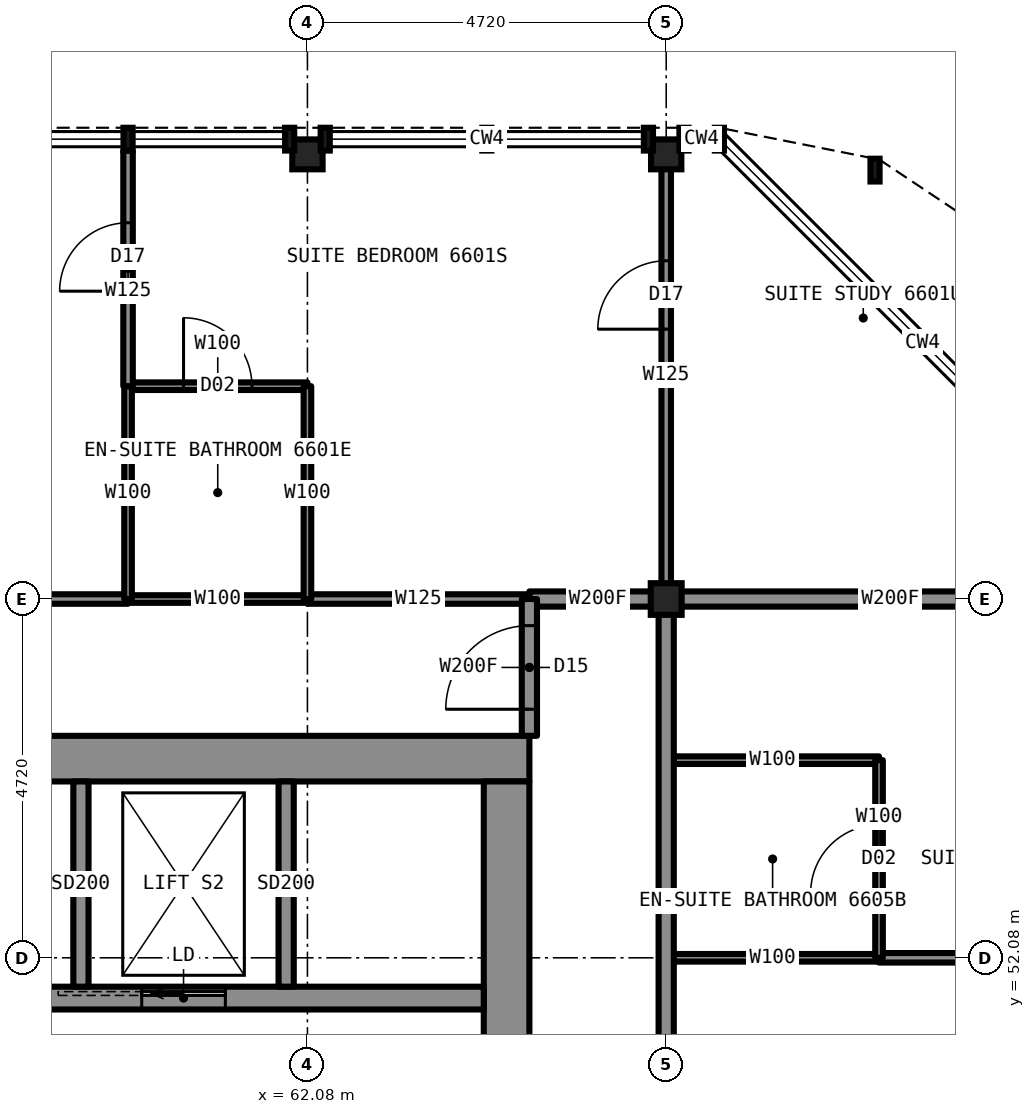
"""IFC4 building model, lengths in metres.
Left out: names, types, materials, properties, quantities, classifications, styles, units other than length and angle.
Written with IfcOpenShell. Run it as: python <this file> out.ifc"""

import sys

from ifc_helpers import new_model, si_unit, direction, frame, frame_2d, origin, origin_2d, place, context, subcontext, project, spatial, rectangle, i_section, extrude, element, fill, save


model = new_model("IFC4")
c1 = context("Model", 3, precision=1e-05, world=origin(), true_north=direction((0.0, 1.0)))
c2 = subcontext(c1, "Body", "Model", "MODEL_VIEW")
j1 = project(units=[si_unit("LENGTHUNIT", "METRE"), si_unit("PLANEANGLEUNIT", "RADIAN")], contexts=[c1])
p1 = place(None, origin())
s1 = spatial("IfcSite", under=j1, at=p1, CompositionType="ELEMENT")
p2 = place(p1, origin())
s2 = spatial("IfcBuilding", under=s1, at=p2, CompositionType="ELEMENT")
p3 = place(p2, frame((0.0, 0.0, 237.2)))
s3 = spatial("IfcBuildingStorey", under=s2, at=p3, CompositionType="ELEMENT", Elevation=237.2)
for number, where, z_axis, x_axis in (
    (1, (62.08, 62.65, 0.0), (0.0, 0.0, 1.0), (1.0, 0.0, 0.0)),
    (2, (66.8, 62.65, 0.0), (0.0, 0.0, 1.0), (1.0, 0.0, 0.0)),
):
    element("IfcColumn", number, at=place(p3, frame(where, z_axis=z_axis, x_axis=x_axis)), inside=s3, PredefinedType="COLUMN", context=c2, shape_type="SweptSolid", body=[
        extrude(i_section(OverallWidth=0.399, OverallDepth=0.394, WebThickness=0.023, FlangeThickness=0.037, at=origin_2d()), origin(), (0.0, 0.0, 1.0), 3.5),
    ])
p4 = place(p3, frame((66.8, 56.8, 0.0), z_axis=(0.0, 0.0, 1.0), x_axis=(1.0, 0.0, 0.0)))
e3 = element("IfcColumn", 3, at=p4, inside=s3, PredefinedType="COLUMN", context=c2, shape_type="SweptSolid", body=[
    extrude(i_section(OverallWidth=0.406, OverallDepth=0.417, WebThickness=0.03, FlangeThickness=0.048, at=origin_2d()), origin(), (0.0, 0.0, 1.0), 3.5),
])
p5 = place(p3, frame((45.0, 54.7, 0.0), z_axis=(0.0, 0.0, 1.0), x_axis=(1.0, 0.0, 0.0)))
e4 = element("IfcWall", 4, at=p5, inside=s3, PredefinedType="SHEAR", context=c2, shape_type="SweptSolid", body=[
    extrude(rectangle(XDim=20.0, YDim=0.6, at=frame_2d((10.0, 0.0))), origin(), (0.0, 0.0, 1.0), 3.5),
])
p6 = place(p3, frame((64.7, 35.6, 0.0), z_axis=(0.0, 0.0, 1.0), x_axis=(0.0, 1.0, 0.0)))
e5 = element("IfcWall", 5, at=p6, inside=s3, PredefinedType="SHEAR", context=c2, shape_type="SweptSolid", body=[
    extrude(rectangle(XDim=18.8, YDim=0.6, at=frame_2d((9.4, 0.0))), origin(), (0.0, 0.0, 1.0), 3.5),
])
p7 = place(p6, frame((13.4, 0.0, 0.0)))
e6 = element("IfcOpeningElement", 6, at=p7, cuts=e5, PredefinedType="OPENING", context=c2, shape_type="SweptSolid", body=[
    extrude(rectangle(XDim=1.8, YDim=2.2, at=frame_2d((0.9, 1.1))), frame((0.0, 0.31, 0.0), z_axis=(0.0, -1.0, 0.0), x_axis=(1.0, 0.0, 0.0)), (0.0, 0.0, 1.0), 0.62),
])
p8 = place(p6, frame((3.6, 0.0, 0.0)))
e7 = element("IfcOpeningElement", 7, at=p8, cuts=e5, PredefinedType="OPENING", context=c2, shape_type="SweptSolid", body=[
    extrude(rectangle(XDim=1.8, YDim=2.2, at=frame_2d((0.9, 1.1))), frame((0.0, 0.31, 0.0), z_axis=(0.0, -1.0, 0.0), x_axis=(1.0, 0.0, 0.0)), (0.0, 0.0, 1.0), 0.62),
])
p9 = place(p3, frame((45.6, 51.55, 0.0), z_axis=(0.0, 0.0, 1.0), x_axis=(1.0, 0.0, 0.0)))
e8 = element("IfcWall", 8, at=p9, inside=s3, PredefinedType="SHEAR", context=c2, shape_type="SweptSolid", body=[
    extrude(rectangle(XDim=18.8, YDim=0.3, at=frame_2d((9.4, 0.0))), origin(), (0.0, 0.0, 1.0), 3.5),
])
p10 = place(p9, frame((4.8, 0.0, 0.0)))
e9 = element("IfcOpeningElement", 9, at=p10, cuts=e8, PredefinedType="OPENING", context=c2, shape_type="SweptSolid", body=[
    extrude(rectangle(XDim=1.0, YDim=2.1, at=frame_2d((0.5, 1.05))), frame((0.0, 0.16, 0.0), z_axis=(0.0, -1.0, 0.0), x_axis=(1.0, 0.0, 0.0)), (0.0, 0.0, 1.0), 0.32),
])
p11 = place(p9, frame((11.6, 0.0, 0.0)))
e10 = element("IfcOpeningElement", 10, at=p11, cuts=e8, PredefinedType="OPENING", context=c2, shape_type="SweptSolid", body=[
    extrude(rectangle(XDim=1.1, YDim=2.2, at=frame_2d((0.55, 1.1))), frame((0.0, 0.16, 0.0), z_axis=(0.0, -1.0, 0.0), x_axis=(1.0, 0.0, 0.0)), (0.0, 0.0, 1.0), 0.32),
])
p12 = place(p9, frame((14.3, 0.0, 0.0)))
e11 = element("IfcOpeningElement", 11, at=p12, cuts=e8, PredefinedType="OPENING", context=c2, shape_type="SweptSolid", body=[
    extrude(rectangle(XDim=1.1, YDim=2.2, at=frame_2d((0.55, 1.1))), frame((0.0, 0.16, 0.0), z_axis=(0.0, -1.0, 0.0), x_axis=(1.0, 0.0, 0.0)), (0.0, 0.0, 1.0), 0.32),
])
p13 = place(p3, frame((59.72, 56.8, 0.0), z_axis=(0.0, 0.0, 1.0), x_axis=(1.0, 0.0, 0.0)))
e12 = element("IfcWall", 12, at=p13, inside=s3, PredefinedType="PARTITIONING", context=c2, shape_type="SweptSolid", body=[
    extrude(rectangle(XDim=2.36, YDim=0.1, at=frame_2d((1.18, 0.0))), origin(), (0.0, 0.0, 1.0), 3.33),
])
p14 = place(p3, frame((65.0, 56.8, 0.0), z_axis=(0.0, 0.0, 1.0), x_axis=(1.0, 0.0, 0.0)))
e13 = element("IfcWall", 13, at=p14, inside=s3, PredefinedType="PARTITIONING", context=c2, shape_type="SweptSolid", body=[
    extrude(rectangle(XDim=1.8, YDim=0.2, at=frame_2d((0.9, 0.0))), origin(), (0.0, 0.0, 1.0), 3.33),
])
p15 = place(p3, frame((66.8, 56.8, 0.0), z_axis=(0.0, 0.0, 1.0), x_axis=(1.0, 0.0, 0.0)))
e14 = element("IfcWall", 14, at=p15, inside=s3, PredefinedType="PARTITIONING", context=c2, shape_type="SweptSolid", body=[
    extrude(rectangle(XDim=5.9, YDim=0.2, at=frame_2d((2.95, 0.0))), origin(), (0.0, 0.0, 1.0), 2.573),
])
p16 = place(p3, frame((51.88, 56.8, 0.0), z_axis=(0.0, 0.0, 1.0), x_axis=(1.0, 0.0, 0.0)))
e15 = element("IfcWall", 15, at=p16, inside=s3, PredefinedType="PARTITIONING", context=c2, shape_type="SweptSolid", body=[
    extrude(rectangle(XDim=7.84, YDim=0.125, at=frame_2d((3.92, 0.0))), origin(), (0.0, 0.0, 1.0), 3.33),
])
p17 = place(p16, frame((3.47, 0.0, 0.0)))
e16 = element("IfcOpeningElement", 16, at=p17, cuts=e15, PredefinedType="OPENING", context=c2, shape_type="SweptSolid", body=[
    extrude(rectangle(XDim=0.9, YDim=2.2, at=frame_2d((0.45, 1.1))), frame((0.0, 0.073, 0.0), z_axis=(0.0, -1.0, 0.0), x_axis=(1.0, 0.0, 0.0)), (0.0, 0.0, 1.0), 0.145),
])
p18 = place(p3, frame((62.08, 56.8, 0.0), z_axis=(0.0, 0.0, 1.0), x_axis=(1.0, 0.0, 0.0)))
e17 = element("IfcWall", 17, at=p18, inside=s3, PredefinedType="PARTITIONING", context=c2, shape_type="SweptSolid", body=[
    extrude(rectangle(XDim=2.92, YDim=0.125, at=frame_2d((1.46, 0.0))), origin(), (0.0, 0.0, 1.0), 3.33),
])
p19 = place(p3, frame((59.72, 59.6, 0.0), z_axis=(0.0, 0.0, 1.0), x_axis=(1.0, 0.0, 0.0)))
e18 = element("IfcWall", 18, at=p19, inside=s3, PredefinedType="PARTITIONING", context=c2, shape_type="SweptSolid", body=[
    extrude(rectangle(XDim=2.36, YDim=0.1, at=frame_2d((1.18, 0.0))), origin(), (0.0, 0.0, 1.0), 3.33),
])
p20 = place(p19, frame((0.73, 0.0, 0.0)))
e19 = element("IfcOpeningElement", 19, at=p20, cuts=e18, PredefinedType="OPENING", context=c2, shape_type="SweptSolid", body=[
    extrude(rectangle(XDim=0.9, YDim=2.1, at=frame_2d((0.45, 1.05))), frame((0.0, 0.06, 0.0), z_axis=(0.0, -1.0, 0.0), x_axis=(1.0, 0.0, 0.0)), (0.0, 0.0, 1.0), 0.12),
])
p21 = place(p3, frame((66.8, 52.08, 0.0), z_axis=(0.0, 0.0, 1.0), x_axis=(1.0, 0.0, 0.0)))
e20 = element("IfcWall", 20, at=p21, inside=s3, PredefinedType="PARTITIONING", context=c2, shape_type="SweptSolid", body=[
    extrude(rectangle(XDim=2.8, YDim=0.1, at=frame_2d((1.4, 0.0))), origin(), (0.0, 0.0, 1.0), 2.573),
])
p22 = place(p3, frame((69.6, 52.08, 0.0), z_axis=(0.0, 0.0, 1.0), x_axis=(1.0, 0.0, 0.0)))
e21 = element("IfcWall", 21, at=p22, inside=s3, PredefinedType="PARTITIONING", context=c2, shape_type="SweptSolid", body=[
    extrude(rectangle(XDim=3.1, YDim=0.125, at=frame_2d((1.55, 0.0))), origin(), (0.0, 0.0, 1.0), 2.573),
])
p23 = place(p22, frame((1.25, 0.0, 0.0)))
e22 = element("IfcOpeningElement", 22, at=p23, cuts=e21, PredefinedType="OPENING", context=c2, shape_type="SweptSolid", body=[
    extrude(rectangle(XDim=0.9, YDim=2.2, at=frame_2d((0.45, 1.1))), frame((0.0, 0.073, 0.0), z_axis=(0.0, -1.0, 0.0), x_axis=(1.0, 0.0, 0.0)), (0.0, 0.0, 1.0), 0.145),
])
p24 = place(p3, frame((66.8, 54.68, 0.0), z_axis=(0.0, 0.0, 1.0), x_axis=(1.0, 0.0, 0.0)))
e23 = element("IfcWall", 23, at=p24, inside=s3, PredefinedType="PARTITIONING", context=c2, shape_type="SweptSolid", body=[
    extrude(rectangle(XDim=2.8, YDim=0.1, at=frame_2d((1.4, 0.0))), origin(), (0.0, 0.0, 1.0), 3.33),
])
p25 = place(p3, frame((65.0, 55.0, 0.0), z_axis=(0.0, 0.0, 1.0), x_axis=(0.0, 1.0, 0.0)))
e24 = element("IfcWall", 24, at=p25, inside=s3, PredefinedType="PARTITIONING", context=c2, shape_type="SweptSolid", body=[
    extrude(rectangle(XDim=1.8, YDim=0.2, at=frame_2d((0.9, 0.0))), origin(), (0.0, 0.0, 1.0), 3.33),
])
p26 = place(p25, frame((0.35, 0.0, 0.0)))
e25 = element("IfcOpeningElement", 25, at=p26, cuts=e24, PredefinedType="OPENING", context=c2, shape_type="SweptSolid", body=[
    extrude(rectangle(XDim=1.1, YDim=2.2, at=frame_2d((0.55, 1.1))), frame((0.0, 0.11, 0.0), z_axis=(0.0, -1.0, 0.0), x_axis=(1.0, 0.0, 0.0)), (0.0, 0.0, 1.0), 0.22),
])
p27 = place(p3, frame((66.8, 33.2, 0.0), z_axis=(0.0, 0.0, 1.0), x_axis=(0.0, 1.0, 0.0)))
e26 = element("IfcWall", 26, at=p27, inside=s3, PredefinedType="PARTITIONING", context=c2, shape_type="SweptSolid", body=[
    extrude(rectangle(XDim=23.6, YDim=0.2, at=frame_2d((11.8, 0.0))), origin(), (0.0, 0.0, 1.0), 3.33),
])
p28 = place(p27, frame((8.85, 0.0, 0.0)))
e27 = element("IfcOpeningElement", 27, at=p28, cuts=e26, PredefinedType="OPENING", context=c2, shape_type="SweptSolid", body=[
    extrude(rectangle(XDim=1.1, YDim=2.2, at=frame_2d((0.55, 1.1))), frame((0.0, 0.11, 0.0), z_axis=(0.0, -1.0, 0.0), x_axis=(1.0, 0.0, 0.0)), (0.0, 0.0, 1.0), 0.22),
])
p29 = place(p27, frame((13.65, 0.0, 0.0)))
e28 = element("IfcOpeningElement", 28, at=p29, cuts=e26, PredefinedType="OPENING", context=c2, shape_type="SweptSolid", body=[
    extrude(rectangle(XDim=1.1, YDim=2.2, at=frame_2d((0.55, 1.1))), frame((0.0, 0.11, 0.0), z_axis=(0.0, -1.0, 0.0), x_axis=(1.0, 0.0, 0.0)), (0.0, 0.0, 1.0), 0.22),
])
p30 = place(p3, frame((66.8, 56.8, 0.0), z_axis=(0.0, 0.0, 1.0), x_axis=(0.0, 1.0, 0.0)))
e29 = element("IfcWall", 29, at=p30, inside=s3, PredefinedType="PARTITIONING", context=c2, shape_type="SweptSolid", body=[
    extrude(rectangle(XDim=5.9, YDim=0.125, at=frame_2d((2.95, 0.0))), origin(), (0.0, 0.0, 1.0), 2.573),
])
p31 = place(p30, frame((3.55, 0.0, 0.0)))
e30 = element("IfcOpeningElement", 30, at=p31, cuts=e29, PredefinedType="OPENING", context=c2, shape_type="SweptSolid", body=[
    extrude(rectangle(XDim=0.9, YDim=2.2, at=frame_2d((0.45, 1.1))), frame((0.0, 0.073, 0.0), z_axis=(0.0, -1.0, 0.0), x_axis=(1.0, 0.0, 0.0)), (0.0, 0.0, 1.0), 0.145),
])
p32 = place(p3, frame((69.6, 52.08, 0.0), z_axis=(0.0, 0.0, 1.0), x_axis=(0.0, 1.0, 0.0)))
e31 = element("IfcWall", 31, at=p32, inside=s3, PredefinedType="PARTITIONING", context=c2, shape_type="SweptSolid", body=[
    extrude(rectangle(XDim=2.6, YDim=0.1, at=frame_2d((1.3, 0.0))), origin(), (0.0, 0.0, 1.0), 3.33),
])
p33 = place(p32, frame((0.85, 0.0, 0.0)))
e32 = element("IfcOpeningElement", 32, at=p33, cuts=e31, PredefinedType="OPENING", context=c2, shape_type="SweptSolid", body=[
    extrude(rectangle(XDim=0.9, YDim=2.1, at=frame_2d((0.45, 1.05))), frame((0.0, 0.06, 0.0), z_axis=(0.0, -1.0, 0.0), x_axis=(1.0, 0.0, 0.0)), (0.0, 0.0, 1.0), 0.12),
])
p34 = place(p3, frame((59.72, 56.8, 0.0), z_axis=(0.0, 0.0, 1.0), x_axis=(0.0, 1.0, 0.0)))
e33 = element("IfcWall", 33, at=p34, inside=s3, PredefinedType="PARTITIONING", context=c2, shape_type="SweptSolid", body=[
    extrude(rectangle(XDim=2.8, YDim=0.1, at=frame_2d((1.4, 0.0))), origin(), (0.0, 0.0, 1.0), 3.33),
])
p35 = place(p3, frame((59.72, 59.6, 0.0), z_axis=(0.0, 0.0, 1.0), x_axis=(0.0, 1.0, 0.0)))
e34 = element("IfcWall", 34, at=p35, inside=s3, PredefinedType="PARTITIONING", context=c2, shape_type="SweptSolid", body=[
    extrude(rectangle(XDim=3.1, YDim=0.125, at=frame_2d((1.55, 0.0))), origin(), (0.0, 0.0, 1.0), 3.33),
])
p36 = place(p35, frame((1.25, 0.0, 0.0)))
e35 = element("IfcOpeningElement", 35, at=p36, cuts=e34, PredefinedType="OPENING", context=c2, shape_type="SweptSolid", body=[
    extrude(rectangle(XDim=0.9, YDim=2.2, at=frame_2d((0.45, 1.1))), frame((0.0, 0.073, 0.0), z_axis=(0.0, -1.0, 0.0), x_axis=(1.0, 0.0, 0.0)), (0.0, 0.0, 1.0), 0.145),
])
p37 = place(p3, frame((62.08, 56.8, 0.0), z_axis=(0.0, 0.0, 1.0), x_axis=(0.0, 1.0, 0.0)))
e36 = element("IfcWall", 36, at=p37, inside=s3, PredefinedType="PARTITIONING", context=c2, shape_type="SweptSolid", body=[
    extrude(rectangle(XDim=2.8, YDim=0.1, at=frame_2d((1.4, 0.0))), origin(), (0.0, 0.0, 1.0), 2.573),
])
for number, where, z_axis, x_axis in (
    (37, (59.1, 51.7, 0.0), (0.0, 0.0, 1.0), (0.0, 1.0, 0.0)),
    (38, (61.8, 51.7, 0.0), (0.0, 0.0, 1.0), (0.0, 1.0, 0.0)),
):
    element("IfcWall", number, at=place(p3, frame(where, z_axis=z_axis, x_axis=x_axis)), inside=s3, PredefinedType="PARTITIONING", context=c2, shape_type="SweptSolid", body=[
        extrude(rectangle(XDim=2.7, YDim=0.2, at=frame_2d((1.35, 0.0))), origin(), (0.0, 0.0, 1.0), 3.33),
    ])
p38 = place(p20, origin())
e39 = element("IfcDoor", 39, at=p38, inside=s3, OperationType="SINGLE_SWING_RIGHT", PredefinedType="DOOR", context=c2, shape_type="SweptSolid", body=[
    extrude(rectangle(XDim=0.9, YDim=2.1, at=frame_2d((0.45, 1.05))), frame((0.0, 0.025, 0.0), z_axis=(0.0, -1.0, 0.0), x_axis=(1.0, 0.0, 0.0)), (0.0, 0.0, 1.0), 0.05),
])
fill(e19, e39)
p39 = place(p26, origin())
e40 = element("IfcDoor", 40, at=p39, inside=s3, OperationType="SINGLE_SWING_LEFT", PredefinedType="DOOR", context=c2, shape_type="SweptSolid", body=[
    extrude(rectangle(XDim=1.1, YDim=2.2, at=frame_2d((0.55, 1.1))), frame((0.0, 0.025, 0.0), z_axis=(0.0, -1.0, 0.0), x_axis=(1.0, 0.0, 0.0)), (0.0, 0.0, 1.0), 0.05),
])
fill(e25, e40)
p40 = place(p36, origin())
e41 = element("IfcDoor", 41, at=p40, inside=s3, OperationType="SINGLE_SWING_LEFT", PredefinedType="DOOR", context=c2, shape_type="SweptSolid", body=[
    extrude(rectangle(XDim=0.9, YDim=2.2, at=frame_2d((0.45, 1.1))), frame((0.0, 0.025, 0.0), z_axis=(0.0, -1.0, 0.0), x_axis=(1.0, 0.0, 0.0)), (0.0, 0.0, 1.0), 0.05),
])
fill(e35, e41)
p41 = place(p31, origin())
e42 = element("IfcDoor", 42, at=p41, inside=s3, OperationType="SINGLE_SWING_LEFT", PredefinedType="DOOR", context=c2, shape_type="SweptSolid", body=[
    extrude(rectangle(XDim=0.9, YDim=2.2, at=frame_2d((0.45, 1.1))), frame((0.0, 0.025, 0.0), z_axis=(0.0, -1.0, 0.0), x_axis=(1.0, 0.0, 0.0)), (0.0, 0.0, 1.0), 0.05),
])
fill(e30, e42)
p42 = place(p33, origin())
e43 = element("IfcDoor", 43, at=p42, inside=s3, OperationType="SINGLE_SWING_RIGHT", PredefinedType="DOOR", context=c2, shape_type="SweptSolid", body=[
    extrude(rectangle(XDim=0.9, YDim=2.1, at=frame_2d((0.45, 1.05))), frame((0.0, 0.025, 0.0), z_axis=(0.0, -1.0, 0.0), x_axis=(1.0, 0.0, 0.0)), (0.0, 0.0, 1.0), 0.05),
])
fill(e32, e43)
p43 = place(p12, origin())
e44 = element("IfcDoor", 44, at=p43, inside=s3, OperationType="SLIDING_TO_LEFT", PredefinedType="DOOR", context=c2, shape_type="SweptSolid", body=[
    extrude(rectangle(XDim=1.1, YDim=2.2, at=frame_2d((0.55, 1.1))), frame((0.0, 0.025, 0.0), z_axis=(0.0, -1.0, 0.0), x_axis=(1.0, 0.0, 0.0)), (0.0, 0.0, 1.0), 0.05),
])
fill(e11, e44)
save(model, sys.argv[1])
